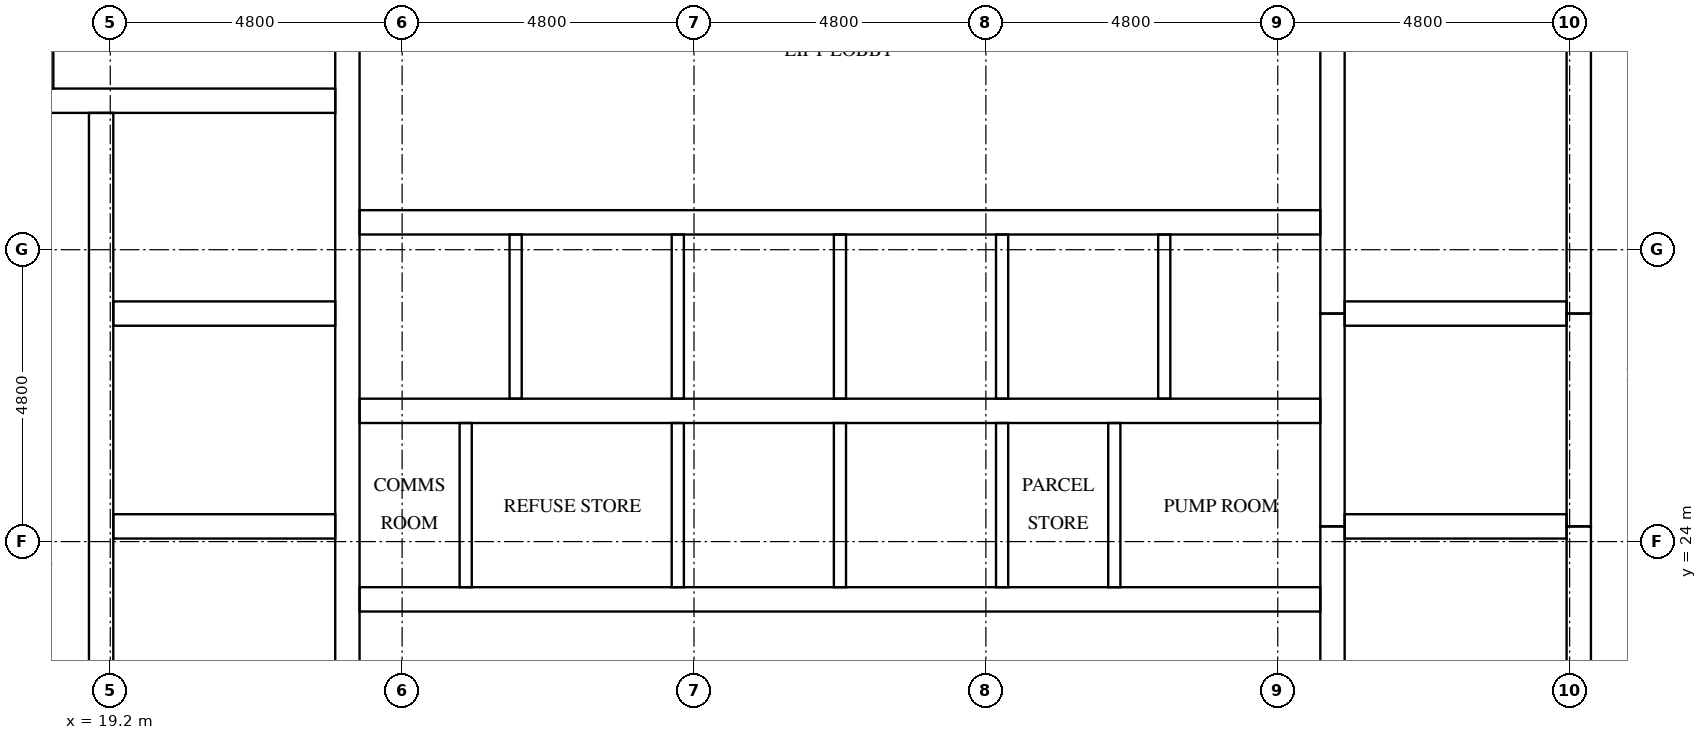
"""IFC4 building model, lengths in metres.
Left out: names, types, materials, properties, quantities, classifications, styles, units other than length and angle.
Written with IfcOpenShell. Run it as: python <this file> out.ifc"""

import sys

from ifc_helpers import new_model, si_unit, direction, frame, frame_2d, origin, place, context, subcontext, project, spatial, rectangle, extrude, element, fill, save


model = new_model("IFC4")
c1 = context("Model", 3, precision=1e-05, world=origin(), true_north=direction((0.0, 1.0)))
c2 = subcontext(c1, "Body", "Model", "MODEL_VIEW")
j1 = project(units=[si_unit("LENGTHUNIT", "METRE"), si_unit("PLANEANGLEUNIT", "RADIAN")], contexts=[c1])
p1 = place(None, origin())
s1 = spatial("IfcSite", under=j1, at=p1, CompositionType="ELEMENT")
p2 = place(p1, origin())
s2 = spatial("IfcBuilding", under=s1, at=p2, CompositionType="ELEMENT")
p3 = place(p2, frame((0.0, 0.0, 279.1)))
s3 = spatial("IfcBuildingStorey", under=s2, at=p3, CompositionType="ELEMENT", Elevation=279.1)
p4 = place(p3, frame((19.05, 15.5, 0.0), z_axis=(0.0, 0.0, 1.0), x_axis=(0.0, 1.0, 0.0)))
e1 = element("IfcWall", 1, at=p4, inside=s3, PredefinedType="SHEAR", context=c2, shape_type="SweptSolid", body=[
    extrude(rectangle(XDim=15.55, YDim=0.4, at=frame_2d((7.775, 0.0))), origin(), (0.0, 0.0, 1.0), 3.2),
])
p5 = place(p4, frame((9.95, 0.0, 0.0)))
e2 = element("IfcOpeningElement", 2, at=p5, cuts=e1, PredefinedType="OPENING", context=c2, shape_type="SweptSolid", body=[
    extrude(rectangle(XDim=1.1, YDim=2.1, at=frame_2d((0.55, 1.05))), frame((0.0, 0.21, 0.0), z_axis=(0.0, -1.0, 0.0), x_axis=(1.0, 0.0, 0.0)), (0.0, 0.0, 1.0), 0.42),
])
p6 = place(p4, frame((13.45, 0.0, 0.0)))
e3 = element("IfcOpeningElement", 3, at=p6, cuts=e1, PredefinedType="OPENING", context=c2, shape_type="SweptSolid", body=[
    extrude(rectangle(XDim=1.1, YDim=2.1, at=frame_2d((0.55, 1.05))), frame((0.0, 0.21, 0.0), z_axis=(0.0, -1.0, 0.0), x_axis=(1.0, 0.0, 0.0)), (0.0, 0.0, 1.0), 0.42),
])
p7 = place(p4, frame((0.7, 0.0, 0.0)))
e4 = element("IfcOpeningElement", 4, at=p7, cuts=e1, PredefinedType="OPENING", context=c2, shape_type="SweptSolid", body=[
    extrude(rectangle(XDim=1.2, YDim=2.1, at=frame_2d((0.6, 1.05))), frame((0.0, 0.21, 0.0), z_axis=(0.0, -1.0, 0.0), x_axis=(1.0, 0.0, 0.0)), (0.0, 0.0, 1.0), 0.42),
])
p8 = place(p3, frame((23.1, 15.5, 0.0), z_axis=(0.0, 0.0, 1.0), x_axis=(0.0, 1.0, 0.0)))
e5 = element("IfcWall", 5, at=p8, inside=s3, PredefinedType="SHEAR", context=c2, shape_type="SweptSolid", body=[
    extrude(rectangle(XDim=21.8, YDim=0.4, at=frame_2d((10.9, 0.0))), origin(), (0.0, 0.0, 1.0), 3.2),
])
p9 = place(p3, frame((39.3, 15.5, 0.0), z_axis=(0.0, 0.0, 1.0), x_axis=(0.0, 1.0, 0.0)))
e6 = element("IfcWall", 6, at=p9, inside=s3, PredefinedType="SHEAR", context=c2, shape_type="SweptSolid", body=[
    extrude(rectangle(XDim=8.75, YDim=0.4, at=frame_2d((4.375, 0.0))), origin(), (0.0, 0.0, 1.0), 3.2),
])
p10 = place(p3, frame((39.3, 24.25, 0.0), z_axis=(0.0, 0.0, 1.0), x_axis=(0.0, 1.0, 0.0)))
e7 = element("IfcWall", 7, at=p10, inside=s3, PredefinedType="SHEAR", context=c2, shape_type="SweptSolid", body=[
    extrude(rectangle(XDim=3.5, YDim=0.4, at=frame_2d((1.75, 0.0))), origin(), (0.0, 0.0, 1.0), 3.2),
])
p11 = place(p3, frame((39.3, 27.75, 0.0), z_axis=(0.0, 0.0, 1.0), x_axis=(0.0, 1.0, 0.0)))
e8 = element("IfcWall", 8, at=p11, inside=s3, PredefinedType="SHEAR", context=c2, shape_type="SweptSolid", body=[
    extrude(rectangle(XDim=9.55, YDim=0.4, at=frame_2d((4.775, 0.0))), origin(), (0.0, 0.0, 1.0), 3.2),
])
p12 = place(p3, frame((43.35, 15.5, 0.0), z_axis=(0.0, 0.0, 1.0), x_axis=(0.0, 1.0, 0.0)))
e9 = element("IfcWall", 9, at=p12, inside=s3, PredefinedType="SHEAR", context=c2, shape_type="SweptSolid", body=[
    extrude(rectangle(XDim=8.75, YDim=0.4, at=frame_2d((4.375, 0.0))), origin(), (0.0, 0.0, 1.0), 3.2),
])
p13 = place(p12, frame((0.7, 0.0, 0.0)))
e10 = element("IfcOpeningElement", 10, at=p13, cuts=e9, PredefinedType="OPENING", context=c2, shape_type="SweptSolid", body=[
    extrude(rectangle(XDim=1.2, YDim=2.1, at=frame_2d((0.6, 1.05))), frame((0.0, 0.21, 0.0), z_axis=(0.0, -1.0, 0.0), x_axis=(1.0, 0.0, 0.0)), (0.0, 0.0, 1.0), 0.42),
])
p14 = place(p3, frame((43.35, 24.25, 0.0), z_axis=(0.0, 0.0, 1.0), x_axis=(0.0, 1.0, 0.0)))
e11 = element("IfcWall", 11, at=p14, inside=s3, PredefinedType="SHEAR", context=c2, shape_type="SweptSolid", body=[
    extrude(rectangle(XDim=3.5, YDim=0.4, at=frame_2d((1.75, 0.0))), origin(), (0.0, 0.0, 1.0), 3.2),
])
p15 = place(p14, frame((1.2, 0.0, 0.0)))
e12 = element("IfcOpeningElement", 12, at=p15, cuts=e11, PredefinedType="OPENING", context=c2, shape_type="SweptSolid", body=[
    extrude(rectangle(XDim=1.1, YDim=2.1, at=frame_2d((0.55, 1.05))), frame((0.0, 0.21, 0.0), z_axis=(0.0, -1.0, 0.0), x_axis=(1.0, 0.0, 0.0)), (0.0, 0.0, 1.0), 0.42),
])
p16 = place(p3, frame((43.35, 27.75, 0.0), z_axis=(0.0, 0.0, 1.0), x_axis=(0.0, 1.0, 0.0)))
e13 = element("IfcWall", 13, at=p16, inside=s3, PredefinedType="SHEAR", context=c2, shape_type="SweptSolid", body=[
    extrude(rectangle(XDim=9.55, YDim=0.4, at=frame_2d((4.775, 0.0))), origin(), (0.0, 0.0, 1.0), 3.2),
])
p17 = place(p16, frame((7.65, 0.0, 0.0)))
e14 = element("IfcOpeningElement", 14, at=p17, cuts=e13, PredefinedType="OPENING", context=c2, shape_type="SweptSolid", body=[
    extrude(rectangle(XDim=1.2, YDim=2.1, at=frame_2d((0.6, 1.05))), frame((0.0, 0.21, 0.0), z_axis=(0.0, -1.0, 0.0), x_axis=(1.0, 0.0, 0.0)), (0.0, 0.0, 1.0), 0.42),
])
for number, where, z_axis, x_axis in (
    (15, (19.25, 24.25, 0.0), (0.0, 0.0, 1.0), (1.0, 0.0, 0.0)),
    (16, (19.25, 27.75, 0.0), (0.0, 0.0, 1.0), (1.0, 0.0, 0.0)),
):
    element("IfcWall", number, at=place(p3, frame(where, z_axis=z_axis, x_axis=x_axis)), inside=s3, PredefinedType="SHEAR", context=c2, shape_type="SweptSolid", body=[
        extrude(rectangle(XDim=3.65, YDim=0.4, at=frame_2d((1.825, 0.0))), origin(), (0.0, 0.0, 1.0), 3.2),
    ])
p18 = place(p3, frame((15.5, 31.25, 0.0), z_axis=(0.0, 0.0, 1.0), x_axis=(1.0, 0.0, 0.0)))
e17 = element("IfcWall", 17, at=p18, inside=s3, PredefinedType="SHEAR", context=c2, shape_type="SweptSolid", body=[
    extrude(rectangle(XDim=7.4, YDim=0.4, at=frame_2d((3.7, 0.0))), origin(), (0.0, 0.0, 1.0), 3.2),
])
for number, where, z_axis, x_axis in (
    (18, (39.5, 24.25, 0.0), (0.0, 0.0, 1.0), (1.0, 0.0, 0.0)),
    (19, (39.5, 27.75, 0.0), (0.0, 0.0, 1.0), (1.0, 0.0, 0.0)),
):
    element("IfcWall", number, at=place(p3, frame(where, z_axis=z_axis, x_axis=x_axis)), inside=s3, PredefinedType="SHEAR", context=c2, shape_type="SweptSolid", body=[
        extrude(rectangle(XDim=3.65, YDim=0.4, at=frame_2d((1.825, 0.0))), origin(), (0.0, 0.0, 1.0), 3.2),
    ])
p19 = place(p3, frame((23.3, 23.05, 0.0), z_axis=(0.0, 0.0, 1.0), x_axis=(1.0, 0.0, 0.0)))
e20 = element("IfcWall", 20, at=p19, inside=s3, PredefinedType="SHEAR", context=c2, shape_type="SweptSolid", body=[
    extrude(rectangle(XDim=15.8, YDim=0.4, at=frame_2d((7.9, 0.0))), origin(), (0.0, 0.0, 1.0), 3.2),
])
p20 = place(p19, frame((0.323, 0.0, 0.0)))
e21 = element("IfcOpeningElement", 21, at=p20, cuts=e20, PredefinedType="OPENING", context=c2, shape_type="SweptSolid", body=[
    extrude(rectangle(XDim=1.0, YDim=2.1, at=frame_2d((0.5, 1.05))), frame((0.0, 0.21, 0.0), z_axis=(0.0, -1.0, 0.0), x_axis=(1.0, 0.0, 0.0)), (0.0, 0.0, 1.0), 0.42),
])
p21 = place(p19, frame((2.989, 0.0, 0.0)))
e22 = element("IfcOpeningElement", 22, at=p21, cuts=e20, PredefinedType="OPENING", context=c2, shape_type="SweptSolid", body=[
    extrude(rectangle(XDim=1.0, YDim=2.1, at=frame_2d((0.5, 1.05))), frame((0.0, 0.21, 0.0), z_axis=(0.0, -1.0, 0.0), x_axis=(1.0, 0.0, 0.0)), (0.0, 0.0, 1.0), 0.42),
])
p22 = place(p19, frame((10.989, 0.0, 0.0)))
e23 = element("IfcOpeningElement", 23, at=p22, cuts=e20, PredefinedType="OPENING", context=c2, shape_type="SweptSolid", body=[
    extrude(rectangle(XDim=1.0, YDim=2.1, at=frame_2d((0.5, 1.05))), frame((0.0, 0.21, 0.0), z_axis=(0.0, -1.0, 0.0), x_axis=(1.0, 0.0, 0.0)), (0.0, 0.0, 1.0), 0.42),
])
p23 = place(p19, frame((13.656, 0.0, 0.0)))
e24 = element("IfcOpeningElement", 24, at=p23, cuts=e20, PredefinedType="OPENING", context=c2, shape_type="SweptSolid", body=[
    extrude(rectangle(XDim=1.0, YDim=2.1, at=frame_2d((0.5, 1.05))), frame((0.0, 0.21, 0.0), z_axis=(0.0, -1.0, 0.0), x_axis=(1.0, 0.0, 0.0)), (0.0, 0.0, 1.0), 0.42),
])
p24 = place(p3, frame((23.3, 26.15, 0.0), z_axis=(0.0, 0.0, 1.0), x_axis=(1.0, 0.0, 0.0)))
e25 = element("IfcWall", 25, at=p24, inside=s3, PredefinedType="SHEAR", context=c2, shape_type="SweptSolid", body=[
    extrude(rectangle(XDim=15.8, YDim=0.4, at=frame_2d((7.9, 0.0))), origin(), (0.0, 0.0, 1.0), 3.2),
])
p25 = place(p3, frame((23.3, 29.25, 0.0), z_axis=(0.0, 0.0, 1.0), x_axis=(1.0, 0.0, 0.0)))
e26 = element("IfcWall", 26, at=p25, inside=s3, PredefinedType="SHEAR", context=c2, shape_type="SweptSolid", body=[
    extrude(rectangle(XDim=15.8, YDim=0.4, at=frame_2d((7.9, 0.0))), origin(), (0.0, 0.0, 1.0), 3.2),
])
p26 = place(p25, frame((0.683, 0.0, 0.0)))
e27 = element("IfcOpeningElement", 27, at=p26, cuts=e26, PredefinedType="OPENING", context=c2, shape_type="SweptSolid", body=[
    extrude(rectangle(XDim=1.1, YDim=2.1, at=frame_2d((0.55, 1.05))), frame((0.0, 0.21, 0.0), z_axis=(0.0, -1.0, 0.0), x_axis=(1.0, 0.0, 0.0)), (0.0, 0.0, 1.0), 0.42),
])
p27 = place(p25, frame((3.35, 0.0, 0.0)))
e28 = element("IfcOpeningElement", 28, at=p27, cuts=e26, PredefinedType="OPENING", context=c2, shape_type="SweptSolid", body=[
    extrude(rectangle(XDim=1.1, YDim=2.1, at=frame_2d((0.55, 1.05))), frame((0.0, 0.21, 0.0), z_axis=(0.0, -1.0, 0.0), x_axis=(1.0, 0.0, 0.0)), (0.0, 0.0, 1.0), 0.42),
])
p28 = place(p25, frame((6.017, 0.0, 0.0)))
e29 = element("IfcOpeningElement", 29, at=p28, cuts=e26, PredefinedType="OPENING", context=c2, shape_type="SweptSolid", body=[
    extrude(rectangle(XDim=1.1, YDim=2.1, at=frame_2d((0.55, 1.05))), frame((0.0, 0.21, 0.0), z_axis=(0.0, -1.0, 0.0), x_axis=(1.0, 0.0, 0.0)), (0.0, 0.0, 1.0), 0.42),
])
p29 = place(p25, frame((8.683, 0.0, 0.0)))
e30 = element("IfcOpeningElement", 30, at=p29, cuts=e26, PredefinedType="OPENING", context=c2, shape_type="SweptSolid", body=[
    extrude(rectangle(XDim=1.1, YDim=2.1, at=frame_2d((0.55, 1.05))), frame((0.0, 0.21, 0.0), z_axis=(0.0, -1.0, 0.0), x_axis=(1.0, 0.0, 0.0)), (0.0, 0.0, 1.0), 0.42),
])
p30 = place(p25, frame((11.35, 0.0, 0.0)))
e31 = element("IfcOpeningElement", 31, at=p30, cuts=e26, PredefinedType="OPENING", context=c2, shape_type="SweptSolid", body=[
    extrude(rectangle(XDim=1.1, YDim=2.1, at=frame_2d((0.55, 1.05))), frame((0.0, 0.21, 0.0), z_axis=(0.0, -1.0, 0.0), x_axis=(1.0, 0.0, 0.0)), (0.0, 0.0, 1.0), 0.42),
])
p31 = place(p25, frame((14.017, 0.0, 0.0)))
e32 = element("IfcOpeningElement", 32, at=p31, cuts=e26, PredefinedType="OPENING", context=c2, shape_type="SweptSolid", body=[
    extrude(rectangle(XDim=1.1, YDim=2.1, at=frame_2d((0.55, 1.05))), frame((0.0, 0.21, 0.0), z_axis=(0.0, -1.0, 0.0), x_axis=(1.0, 0.0, 0.0)), (0.0, 0.0, 1.0), 0.42),
])
for number, where, z_axis, x_axis in (
    (33, (25.867, 26.35, 0.0), (0.0, 0.0, 1.0), (0.0, 1.0, 0.0)),
    (34, (28.533, 23.25, 0.0), (0.0, 0.0, 1.0), (0.0, 1.0, 0.0)),
    (35, (28.533, 26.35, 0.0), (0.0, 0.0, 1.0), (0.0, 1.0, 0.0)),
    (36, (31.2, 23.25, 0.0), (0.0, 0.0, 1.0), (0.0, 1.0, 0.0)),
    (37, (31.2, 26.35, 0.0), (0.0, 0.0, 1.0), (0.0, 1.0, 0.0)),
    (38, (33.867, 23.25, 0.0), (0.0, 0.0, 1.0), (0.0, 1.0, 0.0)),
    (39, (33.867, 26.35, 0.0), (0.0, 0.0, 1.0), (0.0, 1.0, 0.0)),
    (40, (36.533, 26.35, 0.0), (0.0, 0.0, 1.0), (0.0, 1.0, 0.0)),
):
    element("IfcWall", number, at=place(p3, frame(where, z_axis=z_axis, x_axis=x_axis)), inside=s3, PredefinedType="SOLIDWALL", context=c2, shape_type="SweptSolid", body=[
        extrude(rectangle(XDim=2.7, YDim=0.2, at=frame_2d((1.35, 0.0))), origin(), (0.0, 0.0, 1.0), 3.2),
    ])
p32 = place(p3, frame((18.164, 31.45, 0.0), z_axis=(0.0, 0.0, 1.0), x_axis=(0.0, 1.0, 0.0)))
e41 = element("IfcWall", 41, at=p32, inside=s3, PredefinedType="PARTITIONING", context=c2, shape_type="SweptSolid", body=[
    extrude(rectangle(XDim=5.85, YDim=0.2, at=frame_2d((2.925, 0.0))), origin(), (0.0, 0.0, 1.0), 3.2),
])
for number, where, z_axis, x_axis in (
    (42, (25.045, 23.25, 0.0), (0.0, 0.0, 1.0), (0.0, 1.0, 0.0)),
    (43, (35.712, 23.25, 0.0), (0.0, 0.0, 1.0), (0.0, 1.0, 0.0)),
):
    element("IfcWall", number, at=place(p3, frame(where, z_axis=z_axis, x_axis=x_axis)), inside=s3, PredefinedType="PARTITIONING", context=c2, shape_type="SweptSolid", body=[
        extrude(rectangle(XDim=2.7, YDim=0.2, at=frame_2d((1.35, 0.0))), origin(), (0.0, 0.0, 1.0), 3.2),
    ])
p33 = place(p26, origin())
e44 = element("IfcDoor", 44, at=p33, inside=s3, OperationType="DOUBLE_DOOR_SLIDING", PredefinedType="DOOR", context=c2, shape_type="SweptSolid", body=[
    extrude(rectangle(XDim=1.1, YDim=2.1, at=frame_2d((0.55, 1.05))), frame((0.0, 0.025, 0.0), z_axis=(0.0, -1.0, 0.0), x_axis=(1.0, 0.0, 0.0)), (0.0, 0.0, 1.0), 0.05),
])
fill(e27, e44)
p34 = place(p27, origin())
e45 = element("IfcDoor", 45, at=p34, inside=s3, OperationType="DOUBLE_DOOR_SLIDING", PredefinedType="DOOR", context=c2, shape_type="SweptSolid", body=[
    extrude(rectangle(XDim=1.1, YDim=2.1, at=frame_2d((0.55, 1.05))), frame((0.0, 0.025, 0.0), z_axis=(0.0, -1.0, 0.0), x_axis=(1.0, 0.0, 0.0)), (0.0, 0.0, 1.0), 0.05),
])
fill(e28, e45)
p35 = place(p28, origin())
e46 = element("IfcDoor", 46, at=p35, inside=s3, OperationType="DOUBLE_DOOR_SLIDING", PredefinedType="DOOR", context=c2, shape_type="SweptSolid", body=[
    extrude(rectangle(XDim=1.1, YDim=2.1, at=frame_2d((0.55, 1.05))), frame((0.0, 0.025, 0.0), z_axis=(0.0, -1.0, 0.0), x_axis=(1.0, 0.0, 0.0)), (0.0, 0.0, 1.0), 0.05),
])
fill(e29, e46)
p36 = place(p29, origin())
e47 = element("IfcDoor", 47, at=p36, inside=s3, OperationType="DOUBLE_DOOR_SLIDING", PredefinedType="DOOR", context=c2, shape_type="SweptSolid", body=[
    extrude(rectangle(XDim=1.1, YDim=2.1, at=frame_2d((0.55, 1.05))), frame((0.0, 0.025, 0.0), z_axis=(0.0, -1.0, 0.0), x_axis=(1.0, 0.0, 0.0)), (0.0, 0.0, 1.0), 0.05),
])
fill(e30, e47)
p37 = place(p30, origin())
e48 = element("IfcDoor", 48, at=p37, inside=s3, OperationType="DOUBLE_DOOR_SLIDING", PredefinedType="DOOR", context=c2, shape_type="SweptSolid", body=[
    extrude(rectangle(XDim=1.1, YDim=2.1, at=frame_2d((0.55, 1.05))), frame((0.0, 0.025, 0.0), z_axis=(0.0, -1.0, 0.0), x_axis=(1.0, 0.0, 0.0)), (0.0, 0.0, 1.0), 0.05),
])
fill(e31, e48)
p38 = place(p31, origin())
e49 = element("IfcDoor", 49, at=p38, inside=s3, OperationType="DOUBLE_DOOR_SLIDING", PredefinedType="DOOR", context=c2, shape_type="SweptSolid", body=[
    extrude(rectangle(XDim=1.1, YDim=2.1, at=frame_2d((0.55, 1.05))), frame((0.0, 0.025, 0.0), z_axis=(0.0, -1.0, 0.0), x_axis=(1.0, 0.0, 0.0)), (0.0, 0.0, 1.0), 0.05),
])
fill(e32, e49)
p39 = place(p5, origin())
e50 = element("IfcDoor", 50, at=p39, inside=s3, OperationType="DOUBLE_DOOR_SLIDING", PredefinedType="DOOR", context=c2, shape_type="SweptSolid", body=[
    extrude(rectangle(XDim=1.1, YDim=2.1, at=frame_2d((0.55, 1.05))), frame((0.0, 0.025, 0.0), z_axis=(0.0, -1.0, 0.0), x_axis=(1.0, 0.0, 0.0)), (0.0, 0.0, 1.0), 0.05),
])
fill(e2, e50)
p40 = place(p6, origin())
e51 = element("IfcDoor", 51, at=p40, inside=s3, OperationType="DOUBLE_DOOR_SLIDING", PredefinedType="DOOR", context=c2, shape_type="SweptSolid", body=[
    extrude(rectangle(XDim=1.1, YDim=2.1, at=frame_2d((0.55, 1.05))), frame((0.0, 0.025, 0.0), z_axis=(0.0, -1.0, 0.0), x_axis=(1.0, 0.0, 0.0)), (0.0, 0.0, 1.0), 0.05),
])
fill(e3, e51)
p41 = place(p15, origin())
e52 = element("IfcDoor", 52, at=p41, inside=s3, OperationType="DOUBLE_DOOR_SLIDING", PredefinedType="DOOR", context=c2, shape_type="SweptSolid", body=[
    extrude(rectangle(XDim=1.1, YDim=2.1, at=frame_2d((0.55, 1.05))), frame((0.0, 0.025, 0.0), z_axis=(0.0, -1.0, 0.0), x_axis=(1.0, 0.0, 0.0)), (0.0, 0.0, 1.0), 0.05),
])
fill(e12, e52)
p42 = place(p20, frame((1.0, 0.0, 0.0), z_axis=(0.0, 0.0, 1.0), x_axis=(-1.0, 0.0, 0.0)))
e53 = element("IfcDoor", 53, at=p42, inside=s3, OperationType="SINGLE_SWING_RIGHT", PredefinedType="DOOR", context=c2, shape_type="SweptSolid", body=[
    extrude(rectangle(XDim=1.0, YDim=2.1, at=frame_2d((0.5, 1.05))), frame((0.0, 0.025, 0.0), z_axis=(0.0, -1.0, 0.0), x_axis=(1.0, 0.0, 0.0)), (0.0, 0.0, 1.0), 0.05),
])
fill(e21, e53)
p43 = place(p21, frame((1.0, 0.0, 0.0), z_axis=(0.0, 0.0, 1.0), x_axis=(-1.0, 0.0, 0.0)))
e54 = element("IfcDoor", 54, at=p43, inside=s3, OperationType="SINGLE_SWING_LEFT", PredefinedType="DOOR", context=c2, shape_type="SweptSolid", body=[
    extrude(rectangle(XDim=1.0, YDim=2.1, at=frame_2d((0.5, 1.05))), frame((0.0, 0.025, 0.0), z_axis=(0.0, -1.0, 0.0), x_axis=(1.0, 0.0, 0.0)), (0.0, 0.0, 1.0), 0.05),
])
fill(e22, e54)
p44 = place(p22, frame((1.0, 0.0, 0.0), z_axis=(0.0, 0.0, 1.0), x_axis=(-1.0, 0.0, 0.0)))
e55 = element("IfcDoor", 55, at=p44, inside=s3, OperationType="SINGLE_SWING_RIGHT", PredefinedType="DOOR", context=c2, shape_type="SweptSolid", body=[
    extrude(rectangle(XDim=1.0, YDim=2.1, at=frame_2d((0.5, 1.05))), frame((0.0, 0.025, 0.0), z_axis=(0.0, -1.0, 0.0), x_axis=(1.0, 0.0, 0.0)), (0.0, 0.0, 1.0), 0.05),
])
fill(e23, e55)
p45 = place(p23, frame((1.0, 0.0, 0.0), z_axis=(0.0, 0.0, 1.0), x_axis=(-1.0, 0.0, 0.0)))
e56 = element("IfcDoor", 56, at=p45, inside=s3, OperationType="SINGLE_SWING_LEFT", PredefinedType="DOOR", context=c2, shape_type="SweptSolid", body=[
    extrude(rectangle(XDim=1.0, YDim=2.1, at=frame_2d((0.5, 1.05))), frame((0.0, 0.025, 0.0), z_axis=(0.0, -1.0, 0.0), x_axis=(1.0, 0.0, 0.0)), (0.0, 0.0, 1.0), 0.05),
])
fill(e24, e56)
save(model, sys.argv[1])
